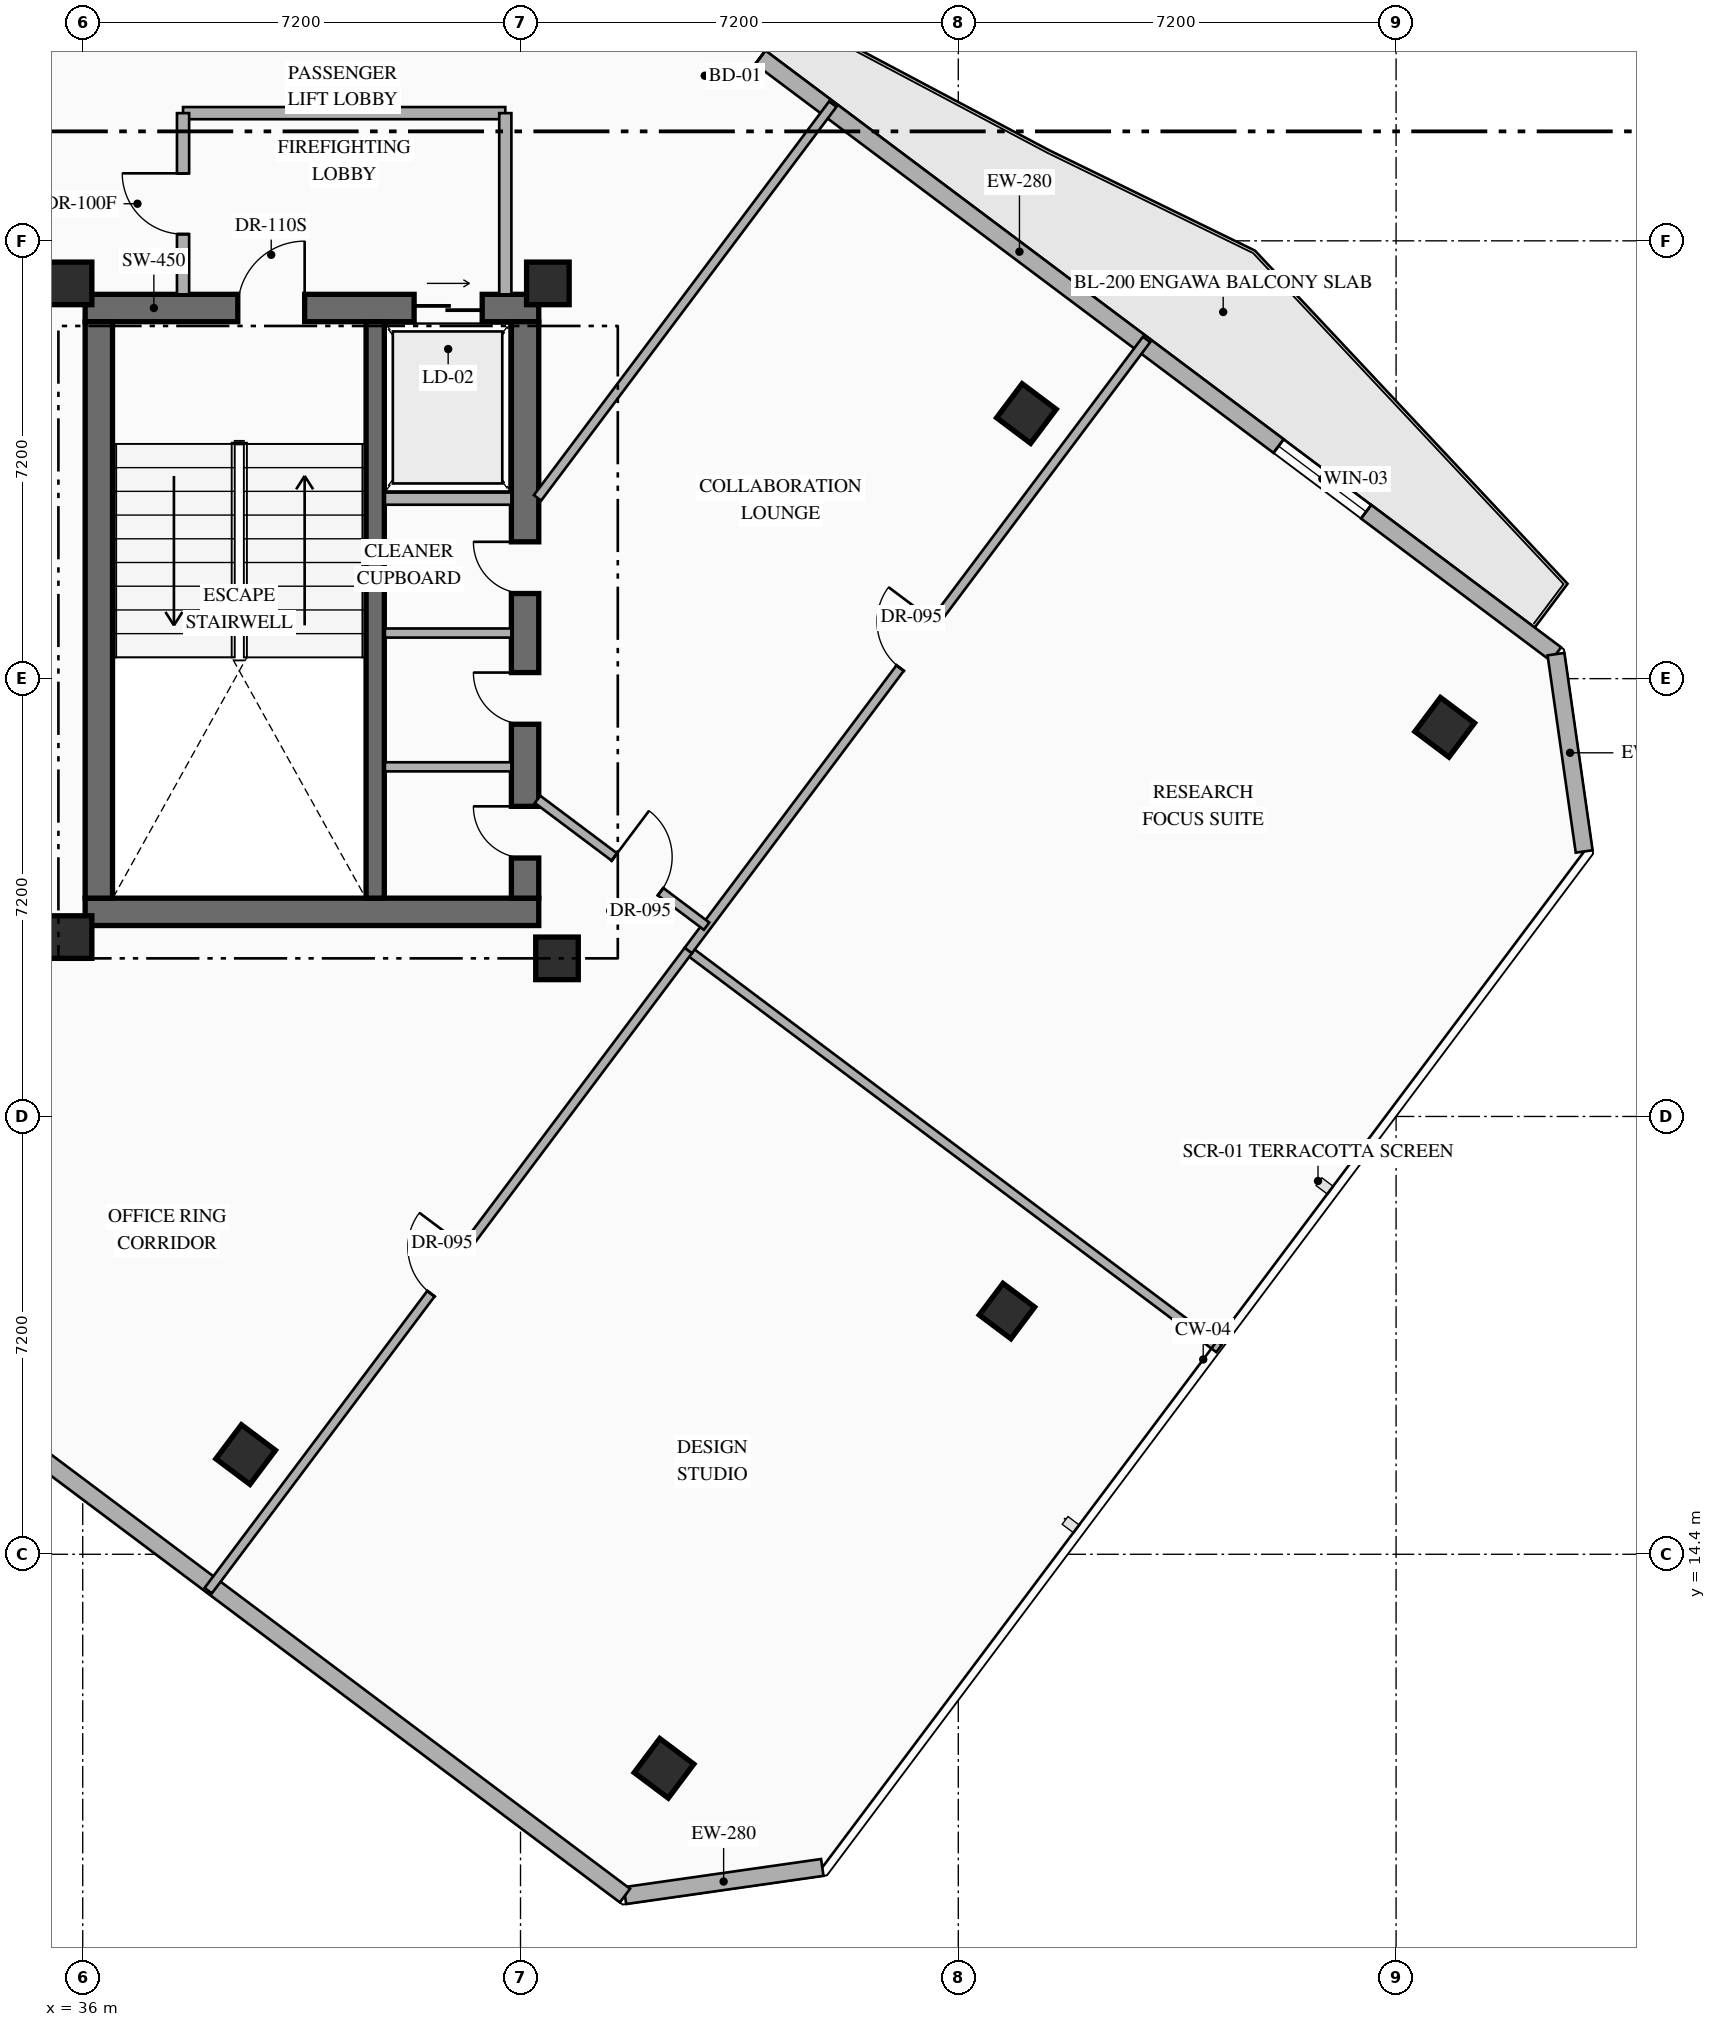
"""IFC4 building model, lengths in metres.
Left out: names, types, materials, properties, quantities, classifications, styles, units other than length and angle.
Written with IfcOpenShell. Run it as: python <this file> out.ifc"""

import sys

from ifc_helpers import new_model, si_unit, direction, frame, frame_2d, origin, origin_2d, place, context, subcontext, project, spatial, rectangle, hollow_rectangle, extrude, element, fill, save


model = new_model("IFC4")
c1 = context("Model", 3, precision=1e-05, world=origin(), true_north=direction((0.0, 1.0)))
c2 = subcontext(c1, "Body", "Model", "MODEL_VIEW")
j1 = project(units=[si_unit("LENGTHUNIT", "METRE"), si_unit("PLANEANGLEUNIT", "RADIAN")], contexts=[c1])
p1 = place(None, origin())
s1 = spatial("IfcSite", under=j1, at=p1, CompositionType="ELEMENT")
p2 = place(p1, origin())
s2 = spatial("IfcBuilding", under=s1, at=p2, CompositionType="ELEMENT")
p3 = place(p2, frame((0.0, 0.0, 216.75)))
s3 = spatial("IfcBuildingStorey", under=s2, at=p3, CompositionType="ELEMENT", Elevation=216.75)
p4 = place(p3, frame((36.04, 24.965, 0.0), z_axis=(0.0, 0.0, 1.0), x_axis=(1.0, 0.0, 0.0)))
e1 = element("IfcWall", 1, at=p4, inside=s3, PredefinedType="SHEAR", context=c2, shape_type="SweptSolid", body=[
    extrude(rectangle(XDim=7.46, YDim=0.45, at=frame_2d((3.73, 0.0))), origin(), (0.0, 0.0, 1.0), 3.6),
])
p5 = place(p3, frame((36.04, 34.895, 0.0), z_axis=(0.0, 0.0, 1.0), x_axis=(1.0, 0.0, 0.0)))
e2 = element("IfcWall", 2, at=p5, inside=s3, PredefinedType="SHEAR", context=c2, shape_type="SweptSolid", body=[
    extrude(rectangle(XDim=7.46, YDim=0.45, at=frame_2d((3.73, 0.0))), origin(), (0.0, 0.0, 1.0), 3.6),
])
p6 = place(p5, frame((2.51, 0.0, 0.0)))
e3 = element("IfcOpeningElement", 3, at=p6, cuts=e2, PredefinedType="OPENING", context=c2, shape_type="SweptSolid", body=[
    extrude(rectangle(XDim=1.1, YDim=2.2, at=frame_2d((0.55, 1.1))), frame((0.0, 0.235, 0.0), z_axis=(0.0, -1.0, 0.0), x_axis=(1.0, 0.0, 0.0)), (0.0, 0.0, 1.0), 0.47),
])
p7 = place(p5, frame((5.41, 0.0, 0.0)))
e4 = element("IfcOpeningElement", 4, at=p7, cuts=e2, PredefinedType="OPENING", context=c2, shape_type="SweptSolid", body=[
    extrude(rectangle(XDim=1.12, YDim=2.15, at=frame_2d((0.56, 1.075))), frame((0.0, 0.235, 0.0), z_axis=(0.0, -1.0, 0.0), x_axis=(1.0, 0.0, 0.0)), (0.0, 0.0, 1.0), 0.47),
])
p8 = place(p3, frame((36.265, 25.19, 0.0), z_axis=(0.0, 0.0, 1.0), x_axis=(0.0, 1.0, 0.0)))
e5 = element("IfcWall", 5, at=p8, inside=s3, PredefinedType="SHEAR", context=c2, shape_type="SweptSolid", body=[
    extrude(rectangle(XDim=9.48, YDim=0.45, at=frame_2d((4.74, 0.0))), origin(), (0.0, 0.0, 1.0), 3.6),
])
p9 = place(p3, frame((43.275, 25.19, 0.0), z_axis=(0.0, 0.0, 1.0), x_axis=(0.0, 1.0, 0.0)))
e6 = element("IfcWall", 6, at=p9, inside=s3, PredefinedType="SHEAR", context=c2, shape_type="SweptSolid", body=[
    extrude(rectangle(XDim=9.48, YDim=0.45, at=frame_2d((4.74, 0.0))), origin(), (0.0, 0.0, 1.0), 3.6),
])
p10 = place(p9, frame((0.66, 0.0, 0.0)))
e7 = element("IfcOpeningElement", 7, at=p10, cuts=e6, PredefinedType="OPENING", context=c2, shape_type="SweptSolid", body=[
    extrude(rectangle(XDim=0.85, YDim=2.08, at=frame_2d((0.425, 1.04))), frame((0.0, 0.235, 0.0), z_axis=(0.0, -1.0, 0.0), x_axis=(1.0, 0.0, 0.0)), (0.0, 0.0, 1.0), 0.47),
])
p11 = place(p9, frame((2.86, 0.0, 0.0)))
e8 = element("IfcOpeningElement", 8, at=p11, cuts=e6, PredefinedType="OPENING", context=c2, shape_type="SweptSolid", body=[
    extrude(rectangle(XDim=0.85, YDim=2.08, at=frame_2d((0.425, 1.04))), frame((0.0, 0.235, 0.0), z_axis=(0.0, -1.0, 0.0), x_axis=(1.0, 0.0, 0.0)), (0.0, 0.0, 1.0), 0.47),
])
p12 = place(p9, frame((5.01, 0.0, 0.0)))
e9 = element("IfcOpeningElement", 9, at=p12, cuts=e6, PredefinedType="OPENING", context=c2, shape_type="SweptSolid", body=[
    extrude(rectangle(XDim=0.85, YDim=2.08, at=frame_2d((0.425, 1.04))), frame((0.0, 0.235, 0.0), z_axis=(0.0, -1.0, 0.0), x_axis=(1.0, 0.0, 0.0)), (0.0, 0.0, 1.0), 0.47),
])
p13 = place(p3, frame((40.81, 25.19, 0.0), z_axis=(0.0, 0.0, 1.0), x_axis=(0.0, 1.0, 0.0)))
e10 = element("IfcWall", 10, at=p13, inside=s3, PredefinedType="SHEAR", context=c2, shape_type="SweptSolid", body=[
    extrude(rectangle(XDim=9.48, YDim=0.3, at=frame_2d((4.74, 0.0))), origin(), (0.0, 0.0, 1.0), 3.6),
])
for number, where, z_axis, x_axis in (
    (11, (35.8, 24.55, 0.0), (0.0, 0.0, 1.0), (1.0, 0.0, 0.0)),
    (12, (43.8, 24.2, 0.0), (0.0, 0.0, 1.0), (1.0, 0.0, 0.0)),
    (13, (35.8, 35.3, 0.0), (0.0, 0.0, 1.0), (1.0, 0.0, 0.0)),
    (14, (43.65, 35.3, 0.0), (0.0, 0.0, 1.0), (1.0, 0.0, 0.0)),
    (15, (38.68, 16.04, 0.0), (0.0, 0.0, 1.0), (0.8, -0.6, 0.0)),
    (16, (51.52, 33.16, 0.0), (0.0, 0.0, 1.0), (0.8, -0.6, 0.0)),
    (17, (45.56, 10.88, 0.0), (0.0, 0.0, 1.0), (0.8, -0.6, 0.0)),
    (18, (58.4, 28.0, 0.0), (0.0, 0.0, 1.0), (0.8, -0.6, 0.0)),
):
    element("IfcColumn", number, at=place(p3, frame(where, z_axis=z_axis, x_axis=x_axis)), inside=s3, PredefinedType="COLUMN", context=c2, shape_type="SweptSolid", body=[
        extrude(hollow_rectangle(XDim=0.7, YDim=0.7, WallThickness=0.028, at=origin_2d()), origin(), (0.0, 0.0, 1.0), 3.6),
    ])
p14 = place(p3, frame((51.2, 18.4, 0.0), z_axis=(0.0, 0.0, 1.0), x_axis=(0.799999996291, -0.600000004945, 0.0)))
e19 = element("IfcColumn", 19, at=p14, inside=s3, PredefinedType="COLUMN", context=c2, shape_type="SweptSolid", body=[
    extrude(hollow_rectangle(XDim=0.65, YDim=0.65, WallThickness=0.025, at=origin_2d()), origin(), (0.0, 0.0, 1.0), 3.6),
])
p15 = place(p3, frame((44.86, 40.73, 0.0), z_axis=(0.0, 0.0, 1.0), x_axis=(0.800007624502, -0.599989833863, 0.0)))
e20 = element("IfcWall", 20, at=p15, inside=s3, PredefinedType="STANDARD", context=c2, shape_type="SweptSolid", body=[
    extrude(rectangle(XDim=19.212, YDim=0.28, at=frame_2d((9.606, 0.0))), origin(), (0.0, 0.0, 1.0), 3.35),
])
p16 = place(p15, frame((1.755, 0.0, 0.0)))
e21 = element("IfcOpeningElement", 21, at=p16, cuts=e20, PredefinedType="OPENING", context=c2, shape_type="SweptSolid", body=[
    extrude(rectangle(XDim=1.1, YDim=2.2, at=frame_2d((0.55, 1.1))), frame((0.0, 0.15, 0.0), z_axis=(0.0, -1.0, 0.0), x_axis=(1.0, 0.0, 0.0)), (0.0, 0.0, 1.0), 0.3),
])
p17 = place(p15, frame((13.509, 0.0, 0.85)))
e22 = element("IfcOpeningElement", 22, at=p17, cuts=e20, PredefinedType="OPENING", context=c2, shape_type="SweptSolid", body=[
    extrude(rectangle(XDim=1.8, YDim=2.1, at=frame_2d((0.9, 1.05))), frame((0.0, 0.15, 0.0), z_axis=(0.0, -1.0, 0.0), x_axis=(1.0, 0.0, 0.0)), (0.0, 0.0, 1.0), 0.3),
])
p18 = place(p3, frame((60.23, 29.203, 0.0), z_axis=(0.0, 0.0, 1.0), x_axis=(0.141296221922, -0.989967361922, 0.0)))
e23 = element("IfcWall", 23, at=p18, inside=s3, PredefinedType="STANDARD", context=c2, shape_type="SweptSolid", body=[
    extrude(rectangle(XDim=3.278, YDim=0.28, at=frame_2d((1.639, 0.0))), origin(), (0.0, 0.0, 1.0), 3.35),
])
p19 = place(p3, frame((48.163, 9.25, 0.0), z_axis=(0.0, 0.0, 1.0), x_axis=(-0.989979263428, -0.141212810973, 0.0)))
e24 = element("IfcWall", 24, at=p19, inside=s3, PredefinedType="STANDARD", context=c2, shape_type="SweptSolid", body=[
    extrude(rectangle(XDim=3.278, YDim=0.28, at=frame_2d((1.639, 0.0))), origin(), (0.0, 0.0, 1.0), 3.35),
])
p20 = place(p3, frame((44.918, 8.787, 0.0), z_axis=(0.0, 0.0, 1.0), x_axis=(-0.800004765927, 0.599993645378, 0.0)))
e25 = element("IfcWall", 25, at=p20, inside=s3, PredefinedType="STANDARD", context=c2, shape_type="SweptSolid", body=[
    extrude(rectangle(XDim=24.588, YDim=0.28, at=frame_2d((12.294, 0.0))), origin(), (0.0, 0.0, 1.0), 3.35),
])
p21 = place(p3, frame((40.97, 31.76, 0.0), z_axis=(0.0, 0.0, 1.0), x_axis=(1.0, 0.0, 0.0)))
e26 = element("IfcWall", 26, at=p21, inside=s3, PredefinedType="STANDARD", context=c2, shape_type="SweptSolid", body=[
    extrude(rectangle(XDim=2.08, YDim=0.2, at=frame_2d((1.04, 0.0))), origin(), (0.0, 0.0, 1.0), 3.35),
])
for number, where, z_axis, x_axis in (
    (27, (40.97, 27.35, 0.0), (0.0, 0.0, 1.0), (1.0, 0.0, 0.0)),
    (28, (40.97, 29.55, 0.0), (0.0, 0.0, 1.0), (1.0, 0.0, 0.0)),
):
    element("IfcWall", number, at=place(p3, frame(where, z_axis=z_axis, x_axis=x_axis)), inside=s3, PredefinedType="PARTITIONING", context=c2, shape_type="SweptSolid", body=[
        extrude(rectangle(XDim=2.08, YDim=0.15, at=frame_2d((1.04, 0.0))), origin(), (0.0, 0.0, 1.0), 3.35),
    ])
p22 = place(p3, frame((37.65, 38.1, 0.0), z_axis=(0.0, 0.0, 1.0), x_axis=(1.0, 0.0, 0.0)))
e29 = element("IfcWall", 29, at=p22, inside=s3, PredefinedType="STANDARD", context=c2, shape_type="SweptSolid", body=[
    extrude(rectangle(XDim=5.3, YDim=0.2, at=frame_2d((2.65, 0.0))), origin(), (0.0, 0.0, 1.0), 3.35),
])
p23 = place(p3, frame((42.95, 35.12, 0.0), z_axis=(0.0, 0.0, 1.0), x_axis=(0.0, 1.0, 0.0)))
e30 = element("IfcWall", 30, at=p23, inside=s3, PredefinedType="STANDARD", context=c2, shape_type="SweptSolid", body=[
    extrude(rectangle(XDim=2.98, YDim=0.2, at=frame_2d((1.49, 0.0))), origin(), (0.0, 0.0, 1.0), 3.35),
])
p24 = place(p3, frame((37.65, 35.12, 0.0), z_axis=(0.0, 0.0, 1.0), x_axis=(0.0, 1.0, 0.0)))
e31 = element("IfcWall", 31, at=p24, inside=s3, PredefinedType="STANDARD", context=c2, shape_type="SweptSolid", body=[
    extrude(rectangle(XDim=2.98, YDim=0.2, at=frame_2d((1.49, 0.0))), origin(), (0.0, 0.0, 1.0), 3.35),
])
p25 = place(p24, frame((0.99, 0.0, 0.0)))
e32 = element("IfcOpeningElement", 32, at=p25, cuts=e31, PredefinedType="OPENING", context=c2, shape_type="SweptSolid", body=[
    extrude(rectangle(XDim=1.0, YDim=2.2, at=frame_2d((0.5, 1.1))), frame((0.0, 0.11, 0.0), z_axis=(0.0, -1.0, 0.0), x_axis=(1.0, 0.0, 0.0)), (0.0, 0.0, 1.0), 0.22),
])
p26 = place(p3, frame((45.96, 24.33, 0.0), z_axis=(0.0, 0.0, 1.0), x_axis=(0.799994629375, -0.600007160767, 0.0)))
e33 = element("IfcWall", 33, at=p26, inside=s3, PredefinedType="PARTITIONING", context=c2, shape_type="SweptSolid", body=[
    extrude(rectangle(XDim=10.91, YDim=0.15, at=frame_2d((5.455, 0.0))), origin(), (0.0, 0.0, 1.0), 3.35),
])
p27 = place(p3, frame((38.064, 13.802, 0.0), z_axis=(0.0, 0.0, 1.0), x_axis=(0.599997031734, 0.800002226191, 0.0)))
e34 = element("IfcWall", 34, at=p27, inside=s3, PredefinedType="PARTITIONING", context=c2, shape_type="SweptSolid", body=[
    extrude(rectangle(XDim=13.16, YDim=0.15, at=frame_2d((6.58, 0.0))), origin(), (0.0, 0.0, 1.0), 3.35),
])
p28 = place(p27, frame((6.105, 0.0, 0.0)))
e35 = element("IfcOpeningElement", 35, at=p28, cuts=e34, PredefinedType="OPENING", context=c2, shape_type="SweptSolid", body=[
    extrude(rectangle(XDim=0.95, YDim=2.15, at=frame_2d((0.475, 1.075))), frame((0.0, 0.085, 0.0), z_axis=(0.0, -1.0, 0.0), x_axis=(1.0, 0.0, 0.0)), (0.0, 0.0, 1.0), 0.17),
])
p29 = place(p3, frame((45.96, 24.33, 0.0), z_axis=(0.0, 0.0, 1.0), x_axis=(0.600012440253, 0.799990669659, 0.0)))
e36 = element("IfcWall", 36, at=p29, inside=s3, PredefinedType="PARTITIONING", context=c2, shape_type="SweptSolid", body=[
    extrude(rectangle(XDim=12.56, YDim=0.15, at=frame_2d((6.28, 0.0))), origin(), (0.0, 0.0, 1.0), 3.35),
])
p30 = place(p29, frame((5.805, 0.0, 0.0)))
e37 = element("IfcOpeningElement", 37, at=p30, cuts=e36, PredefinedType="OPENING", context=c2, shape_type="SweptSolid", body=[
    extrude(rectangle(XDim=0.95, YDim=2.15, at=frame_2d((0.475, 1.075))), frame((0.0, 0.085, 0.0), z_axis=(0.0, -1.0, 0.0), x_axis=(1.0, 0.0, 0.0)), (0.0, 0.0, 1.0), 0.17),
])
p31 = place(p3, frame((43.48, 26.815, 0.0), z_axis=(0.0, 0.0, 1.0), x_axis=(0.800008430676, -0.599988758934, 0.0)))
e38 = element("IfcWall", 38, at=p31, inside=s3, PredefinedType="PARTITIONING", context=c2, shape_type="SweptSolid", body=[
    extrude(rectangle(XDim=3.475, YDim=0.15, at=frame_2d((1.738, 0.0))), origin(), (0.0, 0.0, 1.0), 3.35),
])
p32 = place(p31, frame((1.58, 0.0, 0.0)))
e39 = element("IfcOpeningElement", 39, at=p32, cuts=e38, PredefinedType="OPENING", context=c2, shape_type="SweptSolid", body=[
    extrude(rectangle(XDim=0.95, YDim=2.15, at=frame_2d((0.475, 1.075))), frame((0.0, 0.085, 0.0), z_axis=(0.0, -1.0, 0.0), x_axis=(1.0, 0.0, 0.0)), (0.0, 0.0, 1.0), 0.17),
])
p33 = place(p3, frame((43.48, 31.773, 0.0), z_axis=(0.0, 0.0, 1.0), x_axis=(0.599971041729, 0.800021717885, 0.0)))
e40 = element("IfcWall", 40, at=p33, inside=s3, PredefinedType="PARTITIONING", context=c2, shape_type="SweptSolid", body=[
    extrude(rectangle(XDim=8.094, YDim=0.15, at=frame_2d((4.047, 0.0))), origin(), (0.0, 0.0, 1.0), 3.35),
])
p34 = place(p16, origin())
e41 = element("IfcDoor", 41, at=p34, inside=s3, OperationType="SINGLE_SWING_LEFT", PredefinedType="DOOR", context=c2, shape_type="SweptSolid", body=[
    extrude(rectangle(XDim=1.1, YDim=2.2, at=frame_2d((0.55, 1.1))), frame((0.0, 0.025, 0.0), z_axis=(0.0, -1.0, 0.0), x_axis=(1.0, 0.0, 0.0)), (0.0, 0.0, 1.0), 0.05),
])
fill(e21, e41)
p35 = place(p17, origin())
e42 = element("IfcWindow", 42, at=p35, inside=s3, PartitioningType="SINGLE_PANEL", PredefinedType="WINDOW", context=c2, shape_type="SweptSolid", body=[
    extrude(rectangle(XDim=1.8, YDim=2.1, at=frame_2d((0.9, 1.05))), frame((0.0, 0.03, 0.0), z_axis=(0.0, -1.0, 0.0), x_axis=(1.0, 0.0, 0.0)), (0.0, 0.0, 1.0), 0.06),
])
fill(e22, e42)
p36 = place(p6, origin())
e43 = element("IfcDoor", 43, at=p36, inside=s3, OperationType="SINGLE_SWING_RIGHT", PredefinedType="DOOR", context=c2, shape_type="SweptSolid", body=[
    extrude(rectangle(XDim=1.1, YDim=2.2, at=frame_2d((0.55, 1.1))), frame((0.0, 0.025, 0.0), z_axis=(0.0, -1.0, 0.0), x_axis=(1.0, 0.0, 0.0)), (0.0, 0.0, 1.0), 0.05),
])
fill(e3, e43)
p37 = place(p7, origin())
e44 = element("IfcDoor", 44, at=p37, inside=s3, OperationType="SLIDING_TO_RIGHT", PredefinedType="USERDEFINED", context=c2, shape_type="SweptSolid", body=[
    extrude(rectangle(XDim=1.12, YDim=2.15, at=frame_2d((0.56, 1.075))), frame((0.0, 0.025, 0.0), z_axis=(0.0, -1.0, 0.0), x_axis=(1.0, 0.0, 0.0)), (0.0, 0.0, 1.0), 0.05),
])
fill(e4, e44)
p38 = place(p10, origin())
e45 = element("IfcDoor", 45, at=p38, inside=s3, OperationType="SINGLE_SWING_RIGHT", PredefinedType="DOOR", context=c2, shape_type="SweptSolid", body=[
    extrude(rectangle(XDim=0.85, YDim=2.08, at=frame_2d((0.425, 1.04))), frame((0.0, 0.025, 0.0), z_axis=(0.0, -1.0, 0.0), x_axis=(1.0, 0.0, 0.0)), (0.0, 0.0, 1.0), 0.05),
])
fill(e7, e45)
p39 = place(p11, origin())
e46 = element("IfcDoor", 46, at=p39, inside=s3, OperationType="SINGLE_SWING_RIGHT", PredefinedType="DOOR", context=c2, shape_type="SweptSolid", body=[
    extrude(rectangle(XDim=0.85, YDim=2.08, at=frame_2d((0.425, 1.04))), frame((0.0, 0.025, 0.0), z_axis=(0.0, -1.0, 0.0), x_axis=(1.0, 0.0, 0.0)), (0.0, 0.0, 1.0), 0.05),
])
fill(e8, e46)
p40 = place(p12, origin())
e47 = element("IfcDoor", 47, at=p40, inside=s3, OperationType="SINGLE_SWING_RIGHT", PredefinedType="DOOR", context=c2, shape_type="SweptSolid", body=[
    extrude(rectangle(XDim=0.85, YDim=2.08, at=frame_2d((0.425, 1.04))), frame((0.0, 0.025, 0.0), z_axis=(0.0, -1.0, 0.0), x_axis=(1.0, 0.0, 0.0)), (0.0, 0.0, 1.0), 0.05),
])
fill(e9, e47)
p41 = place(p25, origin())
e48 = element("IfcDoor", 48, at=p41, inside=s3, OperationType="SINGLE_SWING_RIGHT", PredefinedType="DOOR", context=c2, shape_type="SweptSolid", body=[
    extrude(rectangle(XDim=1.0, YDim=2.2, at=frame_2d((0.5, 1.1))), frame((0.0, 0.025, 0.0), z_axis=(0.0, -1.0, 0.0), x_axis=(1.0, 0.0, 0.0)), (0.0, 0.0, 1.0), 0.05),
])
fill(e32, e48)
p42 = place(p28, origin())
e49 = element("IfcDoor", 49, at=p42, inside=s3, OperationType="SINGLE_SWING_RIGHT", PredefinedType="DOOR", context=c2, shape_type="SweptSolid", body=[
    extrude(rectangle(XDim=0.95, YDim=2.15, at=frame_2d((0.475, 1.075))), frame((0.0, 0.025, 0.0), z_axis=(0.0, -1.0, 0.0), x_axis=(1.0, 0.0, 0.0)), (0.0, 0.0, 1.0), 0.05),
])
fill(e35, e49)
p43 = place(p30, origin())
e50 = element("IfcDoor", 50, at=p43, inside=s3, OperationType="SINGLE_SWING_RIGHT", PredefinedType="DOOR", context=c2, shape_type="SweptSolid", body=[
    extrude(rectangle(XDim=0.95, YDim=2.15, at=frame_2d((0.475, 1.075))), frame((0.0, 0.025, 0.0), z_axis=(0.0, -1.0, 0.0), x_axis=(1.0, 0.0, 0.0)), (0.0, 0.0, 1.0), 0.05),
])
fill(e37, e50)
p44 = place(p32, origin())
e51 = element("IfcDoor", 51, at=p44, inside=s3, OperationType="SINGLE_SWING_LEFT", PredefinedType="DOOR", context=c2, shape_type="SweptSolid", body=[
    extrude(rectangle(XDim=0.95, YDim=2.15, at=frame_2d((0.475, 1.075))), frame((0.0, 0.025, 0.0), z_axis=(0.0, -1.0, 0.0), x_axis=(1.0, 0.0, 0.0)), (0.0, 0.0, 1.0), 0.05),
])
fill(e39, e51)
save(model, sys.argv[1])
